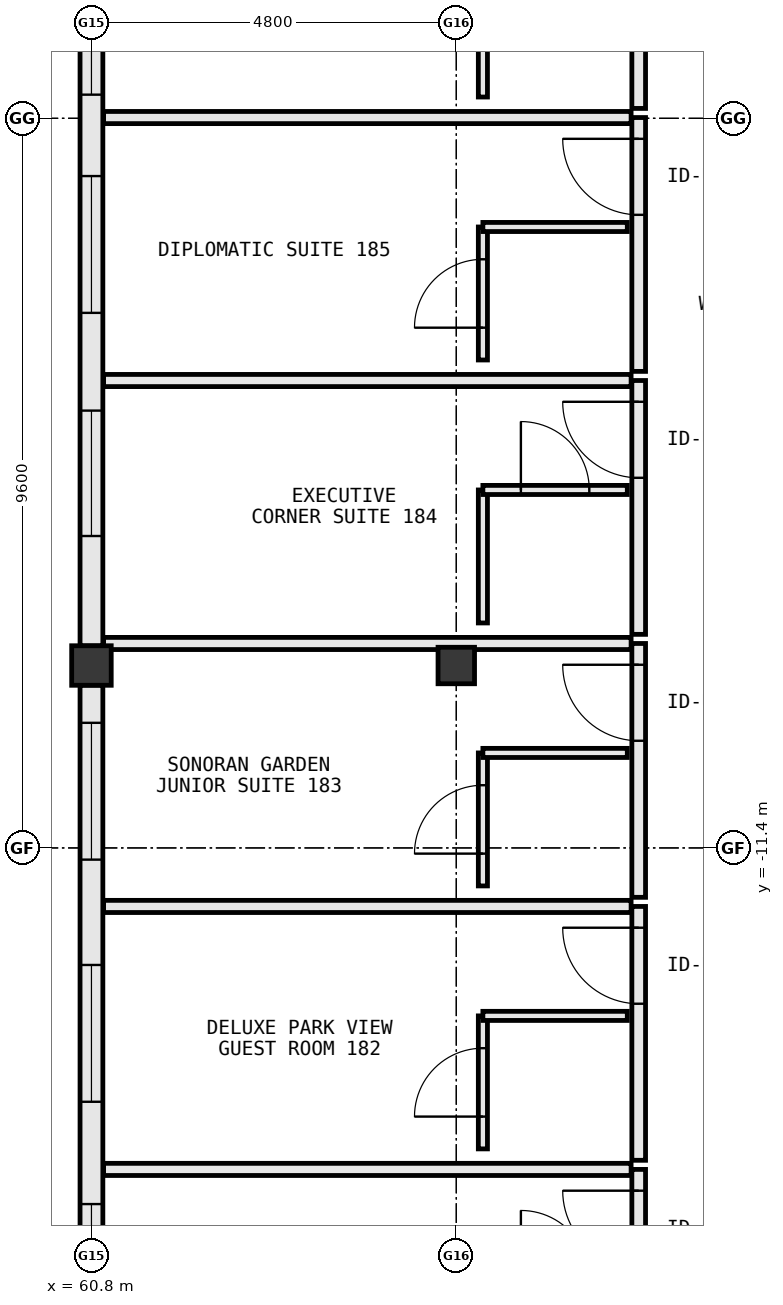
"""IFC4 building model, lengths in metres.
Left out: names, types, materials, properties, quantities, classifications, styles, units other than length and angle.
Written with IfcOpenShell. Run it as: python <this file> out.ifc"""

import sys

from ifc_helpers import new_model, si_unit, direction, frame, frame_2d, origin, origin_2d, place, context, subcontext, project, spatial, rectangle, extrude, element, fill, save


model = new_model("IFC4")
c1 = context("Model", 3, precision=1e-05, world=origin(), true_north=direction((0.0, 1.0)))
c2 = subcontext(c1, "Body", "Model", "MODEL_VIEW")
j1 = project(units=[si_unit("LENGTHUNIT", "METRE"), si_unit("PLANEANGLEUNIT", "RADIAN")], contexts=[c1])
p1 = place(None, origin())
s1 = spatial("IfcSite", under=j1, at=p1, CompositionType="ELEMENT")
p2 = place(p1, origin())
s2 = spatial("IfcBuilding", under=s1, at=p2, CompositionType="ELEMENT")
p3 = place(p2, frame((0.0, 0.0, 27.6)))
s3 = spatial("IfcBuildingStorey", under=s2, at=p3, CompositionType="ELEMENT", Elevation=27.6)
p4 = place(p3, frame((60.8, -9.0, 0.0), z_axis=(0.0, 0.0, 1.0), x_axis=(1.0, 0.0, 0.0)))
e1 = element("IfcColumn", 1, at=p4, inside=s3, PredefinedType="COLUMN", context=c2, shape_type="SweptSolid", body=[
    extrude(rectangle(XDim=0.52, YDim=0.52, at=origin_2d()), origin(), (0.0, 0.0, 1.0), 3.8),
])
p5 = place(p3, frame((65.6, -9.0, 0.0), z_axis=(0.0, 0.0, 1.0), x_axis=(1.0, 0.0, 0.0)))
e2 = element("IfcColumn", 2, at=p5, inside=s3, PredefinedType="COLUMN", context=c2, shape_type="SweptSolid", body=[
    extrude(rectangle(XDim=0.48, YDim=0.48, at=origin_2d()), origin(), (0.0, 0.0, 1.0), 3.8),
])
p6 = place(p3, frame((60.8, 0.342, 0.0), z_axis=(0.0, 0.0, 1.0), x_axis=(0.0, -1.0, 0.0)))
e3 = element("IfcWall", 3, at=p6, inside=s3, PredefinedType="STANDARD", context=c2, shape_type="SweptSolid", body=[
    extrude(rectangle(XDim=9.084, YDim=0.3, at=frame_2d((4.542, 0.0))), origin(), (0.0, 0.0, 1.0), 2.91),
])
p7 = place(p6, frame((5.988, 0.0, 0.85)))
e4 = element("IfcOpeningElement", 4, at=p7, cuts=e3, PredefinedType="OPENING", context=c2, shape_type="SweptSolid", body=[
    extrude(rectangle(XDim=1.65, YDim=1.8, at=frame_2d((0.825, 0.9))), frame((0.0, 0.162, 0.0), z_axis=(0.0, -1.0, 0.0), x_axis=(1.0, 0.0, 0.0)), (0.0, 0.0, 1.0), 0.324),
])
p8 = place(p6, frame((2.902, 0.0, 0.85)))
e5 = element("IfcOpeningElement", 5, at=p8, cuts=e3, PredefinedType="OPENING", context=c2, shape_type="SweptSolid", body=[
    extrude(rectangle(XDim=1.8, YDim=1.85, at=frame_2d((0.9, 0.925))), frame((0.0, 0.162, 0.0), z_axis=(0.0, -1.0, 0.0), x_axis=(1.0, 0.0, 0.0)), (0.0, 0.0, 1.0), 0.324),
])
p9 = place(p6, frame((0.181, 0.0, 0.85)))
e6 = element("IfcOpeningElement", 6, at=p9, cuts=e3, PredefinedType="OPENING", context=c2, shape_type="SweptSolid", body=[
    extrude(rectangle(XDim=1.65, YDim=1.8, at=frame_2d((0.825, 0.9))), frame((0.0, 0.162, 0.0), z_axis=(0.0, -1.0, 0.0), x_axis=(1.0, 0.0, 0.0)), (0.0, 0.0, 1.0), 0.324),
])
p10 = place(p3, frame((60.8, -9.258, 0.0), z_axis=(0.0, 0.0, 1.0), x_axis=(0.0, -1.0, 0.0)))
e7 = element("IfcWall", 7, at=p10, inside=s3, PredefinedType="STANDARD", context=c2, shape_type="SweptSolid", body=[
    extrude(rectangle(XDim=9.084, YDim=0.3, at=frame_2d((4.542, 0.0))), origin(), (0.0, 0.0, 1.0), 2.91),
])
p11 = place(p10, frame((6.828, 0.0, 0.85)))
e8 = element("IfcOpeningElement", 8, at=p11, cuts=e7, PredefinedType="OPENING", context=c2, shape_type="SweptSolid", body=[
    extrude(rectangle(XDim=1.8, YDim=1.85, at=frame_2d((0.9, 0.925))), frame((0.0, 0.162, 0.0), z_axis=(0.0, -1.0, 0.0), x_axis=(1.0, 0.0, 0.0)), (0.0, 0.0, 1.0), 0.324),
])
p12 = place(p10, frame((3.682, 0.0, 0.85)))
e9 = element("IfcOpeningElement", 9, at=p12, cuts=e7, PredefinedType="OPENING", context=c2, shape_type="SweptSolid", body=[
    extrude(rectangle(XDim=1.8, YDim=1.85, at=frame_2d((0.9, 0.925))), frame((0.0, 0.162, 0.0), z_axis=(0.0, -1.0, 0.0), x_axis=(1.0, 0.0, 0.0)), (0.0, 0.0, 1.0), 0.324),
])
p13 = place(p10, frame((0.496, 0.0, 0.85)))
e10 = element("IfcOpeningElement", 10, at=p13, cuts=e7, PredefinedType="OPENING", context=c2, shape_type="SweptSolid", body=[
    extrude(rectangle(XDim=1.8, YDim=1.85, at=frame_2d((0.9, 0.925))), frame((0.0, 0.162, 0.0), z_axis=(0.0, -1.0, 0.0), x_axis=(1.0, 0.0, 0.0)), (0.0, 0.0, 1.0), 0.324),
])
p14 = place(p3, frame((68.0, -18.97, 0.0), z_axis=(0.0, 0.0, 1.0), x_axis=(0.0, 1.0, 0.0)))
e11 = element("IfcWall", 11, at=p14, inside=s3, PredefinedType="PARTITIONING", context=c2, shape_type="SweptSolid", body=[
    extrude(rectangle(XDim=3.34, YDim=0.18, at=frame_2d((1.67, 0.0))), origin(), (0.0, 0.0, 1.0), 3.555),
])
p15 = place(p14, frame((2.06, 0.0, 0.0)))
e12 = element("IfcOpeningElement", 12, at=p15, cuts=e11, PredefinedType="OPENING", context=c2, shape_type="SweptSolid", body=[
    extrude(rectangle(XDim=1.0, YDim=2.2, at=frame_2d((0.5, 1.1))), frame((0.0, 0.102, 0.0), z_axis=(0.0, -1.0, 0.0), x_axis=(1.0, 0.0, 0.0)), (0.0, 0.0, 1.0), 0.204),
])
p16 = place(p3, frame((60.96, -15.63, 0.0), z_axis=(0.0, 0.0, 1.0), x_axis=(1.0, 0.0, 0.0)))
e13 = element("IfcWall", 13, at=p16, inside=s3, PredefinedType="PARTITIONING", context=c2, shape_type="SweptSolid", body=[
    extrude(rectangle(XDim=6.94, YDim=0.16, at=frame_2d((3.47, 0.0))), origin(), (0.0, 0.0, 1.0), 3.555),
])
p17 = place(p3, frame((68.0, -15.51, 0.0), z_axis=(0.0, 0.0, 1.0), x_axis=(0.0, 1.0, 0.0)))
e14 = element("IfcWall", 14, at=p17, inside=s3, PredefinedType="PARTITIONING", context=c2, shape_type="SweptSolid", body=[
    extrude(rectangle(XDim=3.34, YDim=0.18, at=frame_2d((1.67, 0.0))), origin(), (0.0, 0.0, 1.0), 3.555),
])
p18 = place(p17, frame((2.06, 0.0, 0.0)))
e15 = element("IfcOpeningElement", 15, at=p18, cuts=e14, PredefinedType="OPENING", context=c2, shape_type="SweptSolid", body=[
    extrude(rectangle(XDim=1.0, YDim=2.2, at=frame_2d((0.5, 1.1))), frame((0.0, 0.102, 0.0), z_axis=(0.0, -1.0, 0.0), x_axis=(1.0, 0.0, 0.0)), (0.0, 0.0, 1.0), 0.204),
])
p19 = place(p3, frame((60.96, -12.17, 0.0), z_axis=(0.0, 0.0, 1.0), x_axis=(1.0, 0.0, 0.0)))
e16 = element("IfcWall", 16, at=p19, inside=s3, PredefinedType="PARTITIONING", context=c2, shape_type="SweptSolid", body=[
    extrude(rectangle(XDim=6.94, YDim=0.16, at=frame_2d((3.47, 0.0))), origin(), (0.0, 0.0, 1.0), 3.555),
])
p20 = place(p3, frame((65.95, -15.36, 0.0), z_axis=(0.0, 0.0, 1.0), x_axis=(0.0, 1.0, 0.0)))
e17 = element("IfcWall", 17, at=p20, inside=s3, PredefinedType="PARTITIONING", context=c2, shape_type="SweptSolid", body=[
    extrude(rectangle(XDim=1.75, YDim=0.12, at=frame_2d((0.875, 0.0))), origin(), (0.0, 0.0, 1.0), 2.91),
])
p21 = place(p20, frame((0.425, 0.0, 0.0)))
e18 = element("IfcOpeningElement", 18, at=p21, cuts=e17, PredefinedType="OPENING", context=c2, shape_type="SweptSolid", body=[
    extrude(rectangle(XDim=0.9, YDim=2.15, at=frame_2d((0.45, 1.075))), frame((0.0, 0.072, 0.0), z_axis=(0.0, -1.0, 0.0), x_axis=(1.0, 0.0, 0.0)), (0.0, 0.0, 1.0), 0.144),
])
p22 = place(p3, frame((65.95, -13.61, 0.0), z_axis=(0.0, 0.0, 1.0), x_axis=(1.0, 0.0, 0.0)))
e19 = element("IfcWall", 19, at=p22, inside=s3, PredefinedType="PARTITIONING", context=c2, shape_type="SweptSolid", body=[
    extrude(rectangle(XDim=1.9, YDim=0.12, at=frame_2d((0.95, 0.0))), origin(), (0.0, 0.0, 1.0), 3.555),
])
p23 = place(p3, frame((68.0, -12.05, 0.0), z_axis=(0.0, 0.0, 1.0), x_axis=(0.0, 1.0, 0.0)))
e20 = element("IfcWall", 20, at=p23, inside=s3, PredefinedType="PARTITIONING", context=c2, shape_type="SweptSolid", body=[
    extrude(rectangle(XDim=3.34, YDim=0.18, at=frame_2d((1.67, 0.0))), origin(), (0.0, 0.0, 1.0), 3.555),
])
p24 = place(p23, frame((2.06, 0.0, 0.0)))
e21 = element("IfcOpeningElement", 21, at=p24, cuts=e20, PredefinedType="OPENING", context=c2, shape_type="SweptSolid", body=[
    extrude(rectangle(XDim=1.0, YDim=2.2, at=frame_2d((0.5, 1.1))), frame((0.0, 0.102, 0.0), z_axis=(0.0, -1.0, 0.0), x_axis=(1.0, 0.0, 0.0)), (0.0, 0.0, 1.0), 0.204),
])
p25 = place(p3, frame((60.96, -8.71, 0.0), z_axis=(0.0, 0.0, 1.0), x_axis=(1.0, 0.0, 0.0)))
e22 = element("IfcWall", 22, at=p25, inside=s3, PredefinedType="PARTITIONING", context=c2, shape_type="SweptSolid", body=[
    extrude(rectangle(XDim=6.94, YDim=0.16, at=frame_2d((3.47, 0.0))), origin(), (0.0, 0.0, 1.0), 3.01),
])
p26 = place(p3, frame((65.95, -11.9, 0.0), z_axis=(0.0, 0.0, 1.0), x_axis=(0.0, 1.0, 0.0)))
e23 = element("IfcWall", 23, at=p26, inside=s3, PredefinedType="PARTITIONING", context=c2, shape_type="SweptSolid", body=[
    extrude(rectangle(XDim=1.75, YDim=0.12, at=frame_2d((0.875, 0.0))), origin(), (0.0, 0.0, 1.0), 2.91),
])
p27 = place(p26, frame((0.425, 0.0, 0.0)))
e24 = element("IfcOpeningElement", 24, at=p27, cuts=e23, PredefinedType="OPENING", context=c2, shape_type="SweptSolid", body=[
    extrude(rectangle(XDim=0.9, YDim=2.15, at=frame_2d((0.45, 1.075))), frame((0.0, 0.072, 0.0), z_axis=(0.0, -1.0, 0.0), x_axis=(1.0, 0.0, 0.0)), (0.0, 0.0, 1.0), 0.144),
])
p28 = place(p3, frame((65.95, -10.15, 0.0), z_axis=(0.0, 0.0, 1.0), x_axis=(1.0, 0.0, 0.0)))
e25 = element("IfcWall", 25, at=p28, inside=s3, PredefinedType="PARTITIONING", context=c2, shape_type="SweptSolid", body=[
    extrude(rectangle(XDim=1.9, YDim=0.12, at=frame_2d((0.95, 0.0))), origin(), (0.0, 0.0, 1.0), 3.555),
])
p29 = place(p3, frame((68.0, -8.59, 0.0), z_axis=(0.0, 0.0, 1.0), x_axis=(0.0, 1.0, 0.0)))
e26 = element("IfcWall", 26, at=p29, inside=s3, PredefinedType="PARTITIONING", context=c2, shape_type="SweptSolid", body=[
    extrude(rectangle(XDim=3.34, YDim=0.18, at=frame_2d((1.67, 0.0))), origin(), (0.0, 0.0, 1.0), 3.555),
])
p30 = place(p29, frame((2.06, 0.0, 0.0)))
e27 = element("IfcOpeningElement", 27, at=p30, cuts=e26, PredefinedType="OPENING", context=c2, shape_type="SweptSolid", body=[
    extrude(rectangle(XDim=1.0, YDim=2.2, at=frame_2d((0.5, 1.1))), frame((0.0, 0.102, 0.0), z_axis=(0.0, -1.0, 0.0), x_axis=(1.0, 0.0, 0.0)), (0.0, 0.0, 1.0), 0.204),
])
p31 = place(p3, frame((60.96, -5.25, 0.0), z_axis=(0.0, 0.0, 1.0), x_axis=(1.0, 0.0, 0.0)))
e28 = element("IfcWall", 28, at=p31, inside=s3, PredefinedType="PARTITIONING", context=c2, shape_type="SweptSolid", body=[
    extrude(rectangle(XDim=6.94, YDim=0.16, at=frame_2d((3.47, 0.0))), origin(), (0.0, 0.0, 1.0), 3.555),
])
p32 = place(p3, frame((65.95, -8.44, 0.0), z_axis=(0.0, 0.0, 1.0), x_axis=(0.0, 1.0, 0.0)))
e29 = element("IfcWall", 29, at=p32, inside=s3, PredefinedType="PARTITIONING", context=c2, shape_type="SweptSolid", body=[
    extrude(rectangle(XDim=1.75, YDim=0.12, at=frame_2d((0.875, 0.0))), origin(), (0.0, 0.0, 1.0), 2.91),
])
p33 = place(p3, frame((65.95, -6.69, 0.0), z_axis=(0.0, 0.0, 1.0), x_axis=(1.0, 0.0, 0.0)))
e30 = element("IfcWall", 30, at=p33, inside=s3, PredefinedType="PARTITIONING", context=c2, shape_type="SweptSolid", body=[
    extrude(rectangle(XDim=1.9, YDim=0.12, at=frame_2d((0.95, 0.0))), origin(), (0.0, 0.0, 1.0), 3.555),
])
p34 = place(p33, frame((0.5, 0.0, 0.0)))
e31 = element("IfcOpeningElement", 31, at=p34, cuts=e30, PredefinedType="OPENING", context=c2, shape_type="SweptSolid", body=[
    extrude(rectangle(XDim=0.9, YDim=2.15, at=frame_2d((0.45, 1.075))), frame((0.0, 0.072, 0.0), z_axis=(0.0, -1.0, 0.0), x_axis=(1.0, 0.0, 0.0)), (0.0, 0.0, 1.0), 0.144),
])
p35 = place(p3, frame((68.0, -5.13, 0.0), z_axis=(0.0, 0.0, 1.0), x_axis=(0.0, 1.0, 0.0)))
e32 = element("IfcWall", 32, at=p35, inside=s3, PredefinedType="PARTITIONING", context=c2, shape_type="SweptSolid", body=[
    extrude(rectangle(XDim=3.34, YDim=0.18, at=frame_2d((1.67, 0.0))), origin(), (0.0, 0.0, 1.0), 3.555),
])
p36 = place(p35, frame((2.06, 0.0, 0.0)))
e33 = element("IfcOpeningElement", 33, at=p36, cuts=e32, PredefinedType="OPENING", context=c2, shape_type="SweptSolid", body=[
    extrude(rectangle(XDim=1.0, YDim=2.2, at=frame_2d((0.5, 1.1))), frame((0.0, 0.102, 0.0), z_axis=(0.0, -1.0, 0.0), x_axis=(1.0, 0.0, 0.0)), (0.0, 0.0, 1.0), 0.204),
])
p37 = place(p3, frame((60.96, -1.79, 0.0), z_axis=(0.0, 0.0, 1.0), x_axis=(1.0, 0.0, 0.0)))
e34 = element("IfcWall", 34, at=p37, inside=s3, PredefinedType="PARTITIONING", context=c2, shape_type="SweptSolid", body=[
    extrude(rectangle(XDim=6.94, YDim=0.16, at=frame_2d((3.47, 0.0))), origin(), (0.0, 0.0, 1.0), 3.555),
])
p38 = place(p3, frame((65.95, -4.98, 0.0), z_axis=(0.0, 0.0, 1.0), x_axis=(0.0, 1.0, 0.0)))
e35 = element("IfcWall", 35, at=p38, inside=s3, PredefinedType="PARTITIONING", context=c2, shape_type="SweptSolid", body=[
    extrude(rectangle(XDim=1.75, YDim=0.12, at=frame_2d((0.875, 0.0))), origin(), (0.0, 0.0, 1.0), 2.91),
])
p39 = place(p38, frame((0.425, 0.0, 0.0)))
e36 = element("IfcOpeningElement", 36, at=p39, cuts=e35, PredefinedType="OPENING", context=c2, shape_type="SweptSolid", body=[
    extrude(rectangle(XDim=0.9, YDim=2.15, at=frame_2d((0.45, 1.075))), frame((0.0, 0.072, 0.0), z_axis=(0.0, -1.0, 0.0), x_axis=(1.0, 0.0, 0.0)), (0.0, 0.0, 1.0), 0.144),
])
p40 = place(p3, frame((65.95, -3.23, 0.0), z_axis=(0.0, 0.0, 1.0), x_axis=(1.0, 0.0, 0.0)))
e37 = element("IfcWall", 37, at=p40, inside=s3, PredefinedType="PARTITIONING", context=c2, shape_type="SweptSolid", body=[
    extrude(rectangle(XDim=1.9, YDim=0.12, at=frame_2d((0.95, 0.0))), origin(), (0.0, 0.0, 1.0), 3.555),
])
p41 = place(p3, frame((68.0, -1.67, 0.0), z_axis=(0.0, 0.0, 1.0), x_axis=(0.0, 1.0, 0.0)))
e38 = element("IfcWall", 38, at=p41, inside=s3, PredefinedType="PARTITIONING", context=c2, shape_type="SweptSolid", body=[
    extrude(rectangle(XDim=3.34, YDim=0.18, at=frame_2d((1.67, 0.0))), origin(), (0.0, 0.0, 1.0), 3.555),
])
p42 = place(p41, frame((2.06, 0.0, 0.0)))
e39 = element("IfcOpeningElement", 39, at=p42, cuts=e38, PredefinedType="OPENING", context=c2, shape_type="SweptSolid", body=[
    extrude(rectangle(XDim=1.0, YDim=2.2, at=frame_2d((0.5, 1.1))), frame((0.0, 0.102, 0.0), z_axis=(0.0, -1.0, 0.0), x_axis=(1.0, 0.0, 0.0)), (0.0, 0.0, 1.0), 0.204),
])
p43 = place(p3, frame((65.95, -1.52, 0.0), z_axis=(0.0, 0.0, 1.0), x_axis=(0.0, 1.0, 0.0)))
e40 = element("IfcWall", 40, at=p43, inside=s3, PredefinedType="PARTITIONING", context=c2, shape_type="SweptSolid", body=[
    extrude(rectangle(XDim=1.75, YDim=0.12, at=frame_2d((0.875, 0.0))), origin(), (0.0, 0.0, 1.0), 2.91),
])
p44 = place(p7, origin())
e41 = element("IfcWindow", 41, at=p44, inside=s3, PartitioningType="SINGLE_PANEL", PredefinedType="WINDOW", context=c2, shape_type="SweptSolid", body=[
    extrude(rectangle(XDim=1.65, YDim=1.8, at=frame_2d((0.825, 0.9))), frame((0.0, 0.03, 0.0), z_axis=(0.0, -1.0, 0.0), x_axis=(1.0, 0.0, 0.0)), (0.0, 0.0, 1.0), 0.06),
])
fill(e4, e41)
p45 = place(p11, origin())
e42 = element("IfcWindow", 42, at=p45, inside=s3, PartitioningType="SINGLE_PANEL", PredefinedType="WINDOW", context=c2, shape_type="SweptSolid", body=[
    extrude(rectangle(XDim=1.8, YDim=1.85, at=frame_2d((0.9, 0.925))), frame((0.0, 0.03, 0.0), z_axis=(0.0, -1.0, 0.0), x_axis=(1.0, 0.0, 0.0)), (0.0, 0.0, 1.0), 0.06),
])
fill(e8, e42)
p46 = place(p12, origin())
e43 = element("IfcWindow", 43, at=p46, inside=s3, PartitioningType="SINGLE_PANEL", PredefinedType="WINDOW", context=c2, shape_type="SweptSolid", body=[
    extrude(rectangle(XDim=1.8, YDim=1.85, at=frame_2d((0.9, 0.925))), frame((0.0, 0.03, 0.0), z_axis=(0.0, -1.0, 0.0), x_axis=(1.0, 0.0, 0.0)), (0.0, 0.0, 1.0), 0.06),
])
fill(e9, e43)
p47 = place(p13, origin())
e44 = element("IfcWindow", 44, at=p47, inside=s3, PartitioningType="SINGLE_PANEL", PredefinedType="WINDOW", context=c2, shape_type="SweptSolid", body=[
    extrude(rectangle(XDim=1.8, YDim=1.85, at=frame_2d((0.9, 0.925))), frame((0.0, 0.03, 0.0), z_axis=(0.0, -1.0, 0.0), x_axis=(1.0, 0.0, 0.0)), (0.0, 0.0, 1.0), 0.06),
])
fill(e10, e44)
p48 = place(p8, origin())
e45 = element("IfcWindow", 45, at=p48, inside=s3, PartitioningType="SINGLE_PANEL", PredefinedType="WINDOW", context=c2, shape_type="SweptSolid", body=[
    extrude(rectangle(XDim=1.8, YDim=1.85, at=frame_2d((0.9, 0.925))), frame((0.0, 0.03, 0.0), z_axis=(0.0, -1.0, 0.0), x_axis=(1.0, 0.0, 0.0)), (0.0, 0.0, 1.0), 0.06),
])
fill(e5, e45)
p49 = place(p9, origin())
e46 = element("IfcWindow", 46, at=p49, inside=s3, PartitioningType="SINGLE_PANEL", PredefinedType="WINDOW", context=c2, shape_type="SweptSolid", body=[
    extrude(rectangle(XDim=1.65, YDim=1.8, at=frame_2d((0.825, 0.9))), frame((0.0, 0.03, 0.0), z_axis=(0.0, -1.0, 0.0), x_axis=(1.0, 0.0, 0.0)), (0.0, 0.0, 1.0), 0.06),
])
fill(e6, e46)
p50 = place(p15, origin())
e47 = element("IfcDoor", 47, at=p50, inside=s3, OperationType="SINGLE_SWING_RIGHT", PredefinedType="DOOR", context=c2, shape_type="SweptSolid", body=[
    extrude(rectangle(XDim=1.0, YDim=2.2, at=frame_2d((0.5, 1.1))), frame((0.0, 0.025, 0.0), z_axis=(0.0, -1.0, 0.0), x_axis=(1.0, 0.0, 0.0)), (0.0, 0.0, 1.0), 0.05),
])
fill(e12, e47)
p51 = place(p18, origin())
e48 = element("IfcDoor", 48, at=p51, inside=s3, OperationType="SINGLE_SWING_RIGHT", PredefinedType="DOOR", context=c2, shape_type="SweptSolid", body=[
    extrude(rectangle(XDim=1.0, YDim=2.2, at=frame_2d((0.5, 1.1))), frame((0.0, 0.025, 0.0), z_axis=(0.0, -1.0, 0.0), x_axis=(1.0, 0.0, 0.0)), (0.0, 0.0, 1.0), 0.05),
])
fill(e15, e48)
p52 = place(p21, origin())
e49 = element("IfcDoor", 49, at=p52, inside=s3, OperationType="SINGLE_SWING_LEFT", PredefinedType="DOOR", context=c2, shape_type="SweptSolid", body=[
    extrude(rectangle(XDim=0.9, YDim=2.15, at=frame_2d((0.45, 1.075))), frame((0.0, 0.025, 0.0), z_axis=(0.0, -1.0, 0.0), x_axis=(1.0, 0.0, 0.0)), (0.0, 0.0, 1.0), 0.05),
])
fill(e18, e49)
p53 = place(p24, origin())
e50 = element("IfcDoor", 50, at=p53, inside=s3, OperationType="SINGLE_SWING_RIGHT", PredefinedType="DOOR", context=c2, shape_type="SweptSolid", body=[
    extrude(rectangle(XDim=1.0, YDim=2.2, at=frame_2d((0.5, 1.1))), frame((0.0, 0.025, 0.0), z_axis=(0.0, -1.0, 0.0), x_axis=(1.0, 0.0, 0.0)), (0.0, 0.0, 1.0), 0.05),
])
fill(e21, e50)
p54 = place(p27, origin())
e51 = element("IfcDoor", 51, at=p54, inside=s3, OperationType="SINGLE_SWING_LEFT", PredefinedType="DOOR", context=c2, shape_type="SweptSolid", body=[
    extrude(rectangle(XDim=0.9, YDim=2.15, at=frame_2d((0.45, 1.075))), frame((0.0, 0.025, 0.0), z_axis=(0.0, -1.0, 0.0), x_axis=(1.0, 0.0, 0.0)), (0.0, 0.0, 1.0), 0.05),
])
fill(e24, e51)
p55 = place(p30, origin())
e52 = element("IfcDoor", 52, at=p55, inside=s3, OperationType="SINGLE_SWING_RIGHT", PredefinedType="DOOR", context=c2, shape_type="SweptSolid", body=[
    extrude(rectangle(XDim=1.0, YDim=2.2, at=frame_2d((0.5, 1.1))), frame((0.0, 0.025, 0.0), z_axis=(0.0, -1.0, 0.0), x_axis=(1.0, 0.0, 0.0)), (0.0, 0.0, 1.0), 0.05),
])
fill(e27, e52)
p56 = place(p34, origin())
e53 = element("IfcDoor", 53, at=p56, inside=s3, OperationType="SINGLE_SWING_LEFT", PredefinedType="DOOR", context=c2, shape_type="SweptSolid", body=[
    extrude(rectangle(XDim=0.9, YDim=2.15, at=frame_2d((0.45, 1.075))), frame((0.0, 0.025, 0.0), z_axis=(0.0, -1.0, 0.0), x_axis=(1.0, 0.0, 0.0)), (0.0, 0.0, 1.0), 0.05),
])
fill(e31, e53)
p57 = place(p36, origin())
e54 = element("IfcDoor", 54, at=p57, inside=s3, OperationType="SINGLE_SWING_RIGHT", PredefinedType="DOOR", context=c2, shape_type="SweptSolid", body=[
    extrude(rectangle(XDim=1.0, YDim=2.2, at=frame_2d((0.5, 1.1))), frame((0.0, 0.025, 0.0), z_axis=(0.0, -1.0, 0.0), x_axis=(1.0, 0.0, 0.0)), (0.0, 0.0, 1.0), 0.05),
])
fill(e33, e54)
p58 = place(p39, origin())
e55 = element("IfcDoor", 55, at=p58, inside=s3, OperationType="SINGLE_SWING_LEFT", PredefinedType="DOOR", context=c2, shape_type="SweptSolid", body=[
    extrude(rectangle(XDim=0.9, YDim=2.15, at=frame_2d((0.45, 1.075))), frame((0.0, 0.025, 0.0), z_axis=(0.0, -1.0, 0.0), x_axis=(1.0, 0.0, 0.0)), (0.0, 0.0, 1.0), 0.05),
])
fill(e36, e55)
save(model, sys.argv[1])
